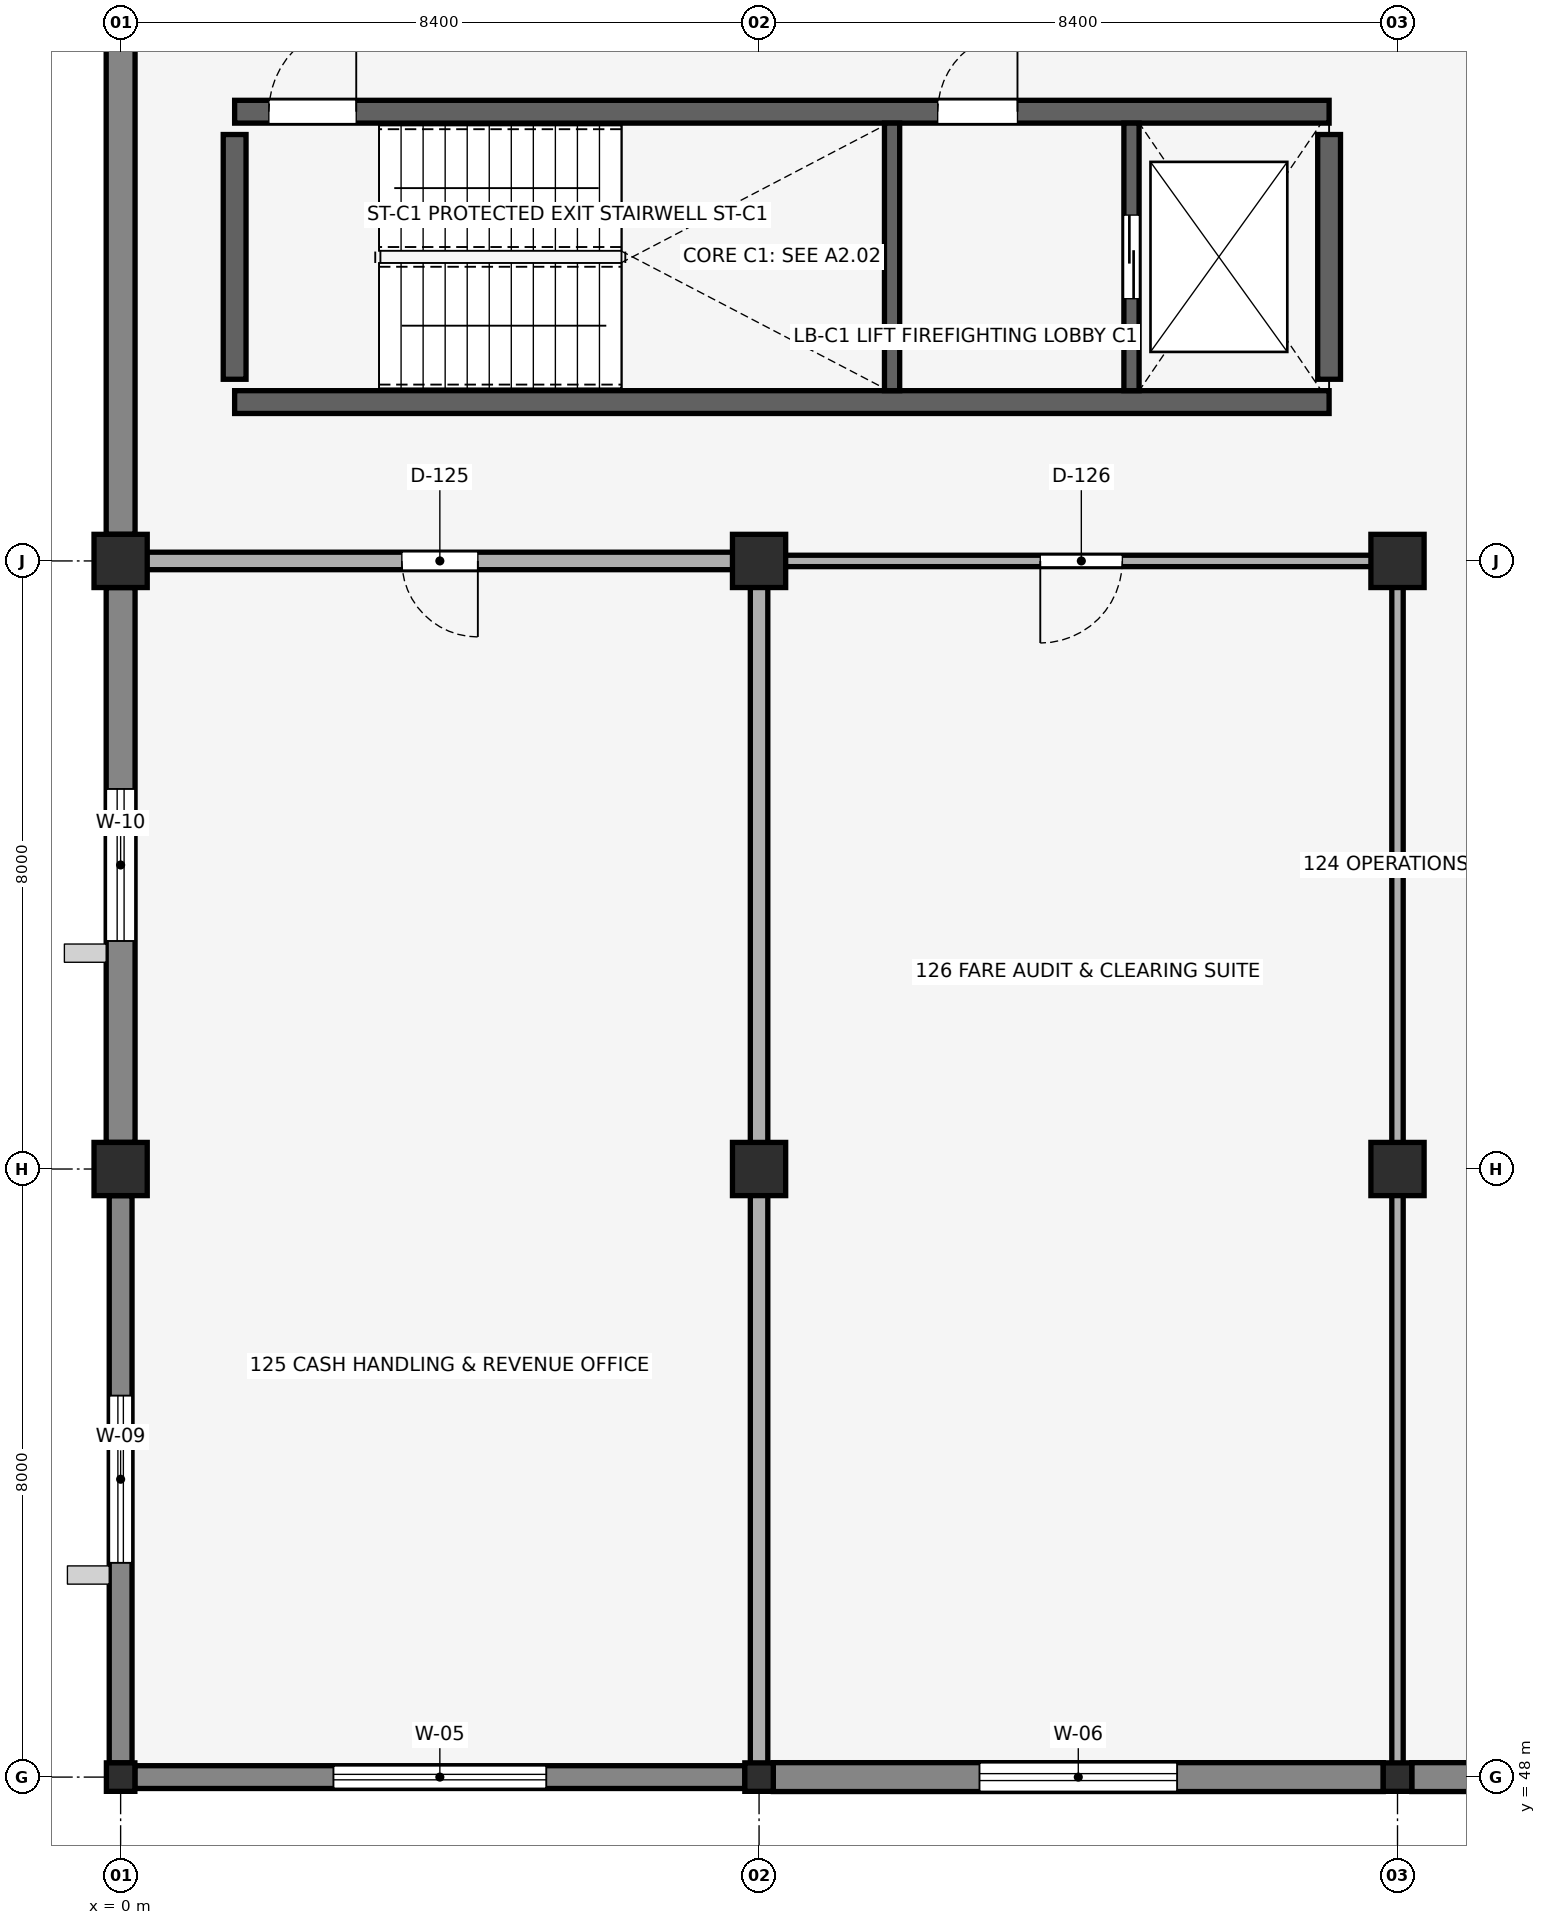
"""IFC4 building model, lengths in metres.
Left out: names, types, materials, properties, quantities, classifications, styles, units other than length and angle.
Written with IfcOpenShell. Run it as: python <this file> out.ifc"""

import sys

from ifc_helpers import new_model, si_unit, direction, frame, frame_2d, origin, origin_2d, place, context, subcontext, project, spatial, rectangle, i_section, extrude, element, fill, save


model = new_model("IFC4")
c1 = context("Model", 3, precision=1e-05, world=origin(), true_north=direction((0.0, 1.0)))
c2 = subcontext(c1, "Body", "Model", "MODEL_VIEW")
j1 = project(units=[si_unit("LENGTHUNIT", "METRE"), si_unit("PLANEANGLEUNIT", "RADIAN")], contexts=[c1])
p1 = place(None, origin())
s1 = spatial("IfcSite", under=j1, at=p1, CompositionType="ELEMENT")
p2 = place(p1, origin())
s2 = spatial("IfcBuilding", under=s1, at=p2, CompositionType="ELEMENT")
p3 = place(p2, frame((0.0, 0.0, 5.44)))
s3 = spatial("IfcBuildingStorey", under=s2, at=p3, CompositionType="ELEMENT", Elevation=5.44)
p4 = place(p3, frame((1.5, 66.09, 0.0), z_axis=(0.0, 0.0, 1.0), x_axis=(1.0, 0.0, 0.0)))
e1 = element("IfcWall", 1, at=p4, inside=s3, PredefinedType="SHEAR", context=c2, shape_type="SweptSolid", body=[
    extrude(rectangle(XDim=14.4, YDim=0.3, at=frame_2d((7.2, 0.0))), origin(), (0.0, 0.0, 1.0), 3.8),
])
p5 = place(p3, frame((1.5, 69.91, 0.0), z_axis=(0.0, 0.0, 1.0), x_axis=(1.0, 0.0, 0.0)))
e2 = element("IfcWall", 2, at=p5, inside=s3, PredefinedType="SHEAR", context=c2, shape_type="SweptSolid", body=[
    extrude(rectangle(XDim=14.4, YDim=0.3, at=frame_2d((7.2, 0.0))), origin(), (0.0, 0.0, 1.0), 3.8),
])
p6 = place(p5, frame((0.45, 0.0, 0.0), z_axis=(0.0, 0.0, 1.0), x_axis=(1.0, 0.0, 0.0)))
e3 = element("IfcOpeningElement", 3, at=p6, cuts=e2, PredefinedType="OPENING", context=c2, shape_type="SweptSolid", body=[
    extrude(rectangle(XDim=1.15, YDim=2.15, at=frame_2d((0.575, 1.075))), frame((0.0, 0.16, 0.0), z_axis=(0.0, -1.0, 0.0), x_axis=(1.0, 0.0, 0.0)), (0.0, 0.0, 1.0), 0.32),
])
p7 = place(p5, frame((9.25, 0.0, 0.0), z_axis=(0.0, 0.0, 1.0), x_axis=(1.0, 0.0, 0.0)))
e4 = element("IfcOpeningElement", 4, at=p7, cuts=e2, PredefinedType="OPENING", context=c2, shape_type="SweptSolid", body=[
    extrude(rectangle(XDim=1.05, YDim=2.15, at=frame_2d((0.525, 1.075))), frame((0.0, 0.16, 0.0), z_axis=(0.0, -1.0, 0.0), x_axis=(1.0, 0.0, 0.0)), (0.0, 0.0, 1.0), 0.32),
])
for number, where, z_axis, x_axis in (
    (5, (1.5, 66.39, 0.0), (0.0, 0.0, 1.0), (0.0, 1.0, 0.0)),
    (6, (15.9, 66.39, 0.0), (0.0, 0.0, 1.0), (0.0, 1.0, 0.0)),
):
    element("IfcWall", number, at=place(p3, frame(where, z_axis=z_axis, x_axis=x_axis)), inside=s3, PredefinedType="SHEAR", context=c2, shape_type="SweptSolid", body=[
        extrude(rectangle(XDim=3.22, YDim=0.3, at=frame_2d((1.61, 0.0))), origin(), (0.0, 0.0, 1.0), 3.8),
    ])
p8 = place(p3, frame((0.0, 48.0, 0.0), z_axis=(0.0, 0.0, 1.0), x_axis=(1.0, 0.0, 0.0)))
e7 = element("IfcColumn", 7, at=p8, inside=s3, PredefinedType="COLUMN", context=c2, shape_type="SweptSolid", body=[
    extrude(i_section(OverallWidth=0.375, OverallDepth=0.375, WebThickness=0.017, FlangeThickness=0.027, FilletRadius=0.015, at=origin_2d()), origin(), (0.0, 0.0, 1.0), 3.8),
])
for number, where, z_axis, x_axis in (
    (8, (0.0, 56.0, 0.0), (0.0, 0.0, 1.0), (1.0, 0.0, 0.0)),
    (9, (0.0, 64.0, 0.0), (0.0, 0.0, 1.0), (1.0, 0.0, 0.0)),
):
    element("IfcColumn", number, at=place(p3, frame(where, z_axis=z_axis, x_axis=x_axis)), inside=s3, PredefinedType="COLUMN", context=c2, shape_type="SweptSolid", body=[
        extrude(rectangle(XDim=0.7, YDim=0.7, at=origin_2d()), origin(), (0.0, 0.0, 1.0), 3.8),
    ])
p9 = place(p3, frame((8.4, 48.0, 0.0), z_axis=(0.0, 0.0, 1.0), x_axis=(1.0, 0.0, 0.0)))
e10 = element("IfcColumn", 10, at=p9, inside=s3, PredefinedType="COLUMN", context=c2, shape_type="SweptSolid", body=[
    extrude(i_section(OverallWidth=0.375, OverallDepth=0.375, WebThickness=0.017, FlangeThickness=0.027, FilletRadius=0.015, at=origin_2d()), origin(), (0.0, 0.0, 1.0), 3.8),
])
for number, where, z_axis, x_axis in (
    (11, (8.4, 56.0, 0.0), (0.0, 0.0, 1.0), (1.0, 0.0, 0.0)),
    (12, (8.4, 64.0, 0.0), (0.0, 0.0, 1.0), (1.0, 0.0, 0.0)),
):
    element("IfcColumn", number, at=place(p3, frame(where, z_axis=z_axis, x_axis=x_axis)), inside=s3, PredefinedType="COLUMN", context=c2, shape_type="SweptSolid", body=[
        extrude(rectangle(XDim=0.7, YDim=0.7, at=origin_2d()), origin(), (0.0, 0.0, 1.0), 3.8),
    ])
p10 = place(p3, frame((16.8, 48.0, 0.0), z_axis=(0.0, 0.0, 1.0), x_axis=(1.0, 0.0, 0.0)))
e13 = element("IfcColumn", 13, at=p10, inside=s3, PredefinedType="COLUMN", context=c2, shape_type="SweptSolid", body=[
    extrude(i_section(OverallWidth=0.375, OverallDepth=0.375, WebThickness=0.017, FlangeThickness=0.027, FilletRadius=0.015, at=origin_2d()), origin(), (0.0, 0.0, 1.0), 3.8),
])
for number, where, z_axis, x_axis in (
    (14, (16.8, 56.0, 0.0), (0.0, 0.0, 1.0), (1.0, 0.0, 0.0)),
    (15, (16.8, 64.0, 0.0), (0.0, 0.0, 1.0), (1.0, 0.0, 0.0)),
):
    element("IfcColumn", number, at=place(p3, frame(where, z_axis=z_axis, x_axis=x_axis)), inside=s3, PredefinedType="COLUMN", context=c2, shape_type="SweptSolid", body=[
        extrude(rectangle(XDim=0.7, YDim=0.7, at=origin_2d()), origin(), (0.0, 0.0, 1.0), 3.8),
    ])
p11 = place(p3, frame((0.187, 48.0, 0.0), z_axis=(0.0, 0.0, 1.0), x_axis=(1.0, 0.0, 0.0)))
e16 = element("IfcWall", 16, at=p11, inside=s3, PredefinedType="SOLIDWALL", context=c2, shape_type="SweptSolid", body=[
    extrude(rectangle(XDim=8.025, YDim=0.3, at=frame_2d((4.013, 0.0))), origin(), (0.0, 0.0, 1.0), 3.45),
])
p12 = place(p11, frame((2.613, 0.0, 0.9), z_axis=(0.0, 0.0, 1.0), x_axis=(1.0, 0.0, 0.0)))
e17 = element("IfcOpeningElement", 17, at=p12, cuts=e16, PredefinedType="OPENING", context=c2, shape_type="SweptSolid", body=[
    extrude(rectangle(XDim=2.8, YDim=1.6, at=frame_2d((1.4, 0.8))), frame((0.0, 0.16, 0.0), z_axis=(0.0, -1.0, 0.0), x_axis=(1.0, 0.0, 0.0)), (0.0, 0.0, 1.0), 0.32),
])
p13 = place(p3, frame((8.587, 48.0, 0.0), z_axis=(0.0, 0.0, 1.0), x_axis=(1.0, 0.0, 0.0)))
e18 = element("IfcWall", 18, at=p13, inside=s3, PredefinedType="SOLIDWALL", context=c2, shape_type="SweptSolid", body=[
    extrude(rectangle(XDim=8.025, YDim=0.38, at=frame_2d((4.013, 0.0))), origin(), (0.0, 0.0, 1.0), 3.45),
])
p14 = place(p13, frame((2.713, 0.0, 0.9), z_axis=(0.0, 0.0, 1.0), x_axis=(1.0, 0.0, 0.0)))
e19 = element("IfcOpeningElement", 19, at=p14, cuts=e18, PredefinedType="OPENING", context=c2, shape_type="SweptSolid", body=[
    extrude(rectangle(XDim=2.6, YDim=1.8, at=frame_2d((1.3, 0.9))), frame((0.0, 0.2, 0.0), z_axis=(0.0, -1.0, 0.0), x_axis=(1.0, 0.0, 0.0)), (0.0, 0.0, 1.0), 0.4),
])
p15 = place(p3, frame((16.987, 48.0, 0.0), z_axis=(0.0, 0.0, 1.0), x_axis=(1.0, 0.0, 0.0)))
e20 = element("IfcWall", 20, at=p15, inside=s3, PredefinedType="SOLIDWALL", context=c2, shape_type="SweptSolid", body=[
    extrude(rectangle(XDim=8.025, YDim=0.38, at=frame_2d((4.013, 0.0))), origin(), (0.0, 0.0, 1.0), 3.45),
])
p16 = place(p15, frame((2.813, 0.0, 0.9), z_axis=(0.0, 0.0, 1.0), x_axis=(1.0, 0.0, 0.0)))
e21 = element("IfcOpeningElement", 21, at=p16, cuts=e20, PredefinedType="OPENING", context=c2, shape_type="SweptSolid", body=[
    extrude(rectangle(XDim=2.4, YDim=1.75, at=frame_2d((1.2, 0.875))), frame((0.0, 0.2, 0.0), z_axis=(0.0, -1.0, 0.0), x_axis=(1.0, 0.0, 0.0)), (0.0, 0.0, 1.0), 0.4),
])
p17 = place(p3, frame((0.0, 48.187, 0.0), z_axis=(0.0, 0.0, 1.0), x_axis=(0.0, 1.0, 0.0)))
e22 = element("IfcWall", 22, at=p17, inside=s3, PredefinedType="SOLIDWALL", context=c2, shape_type="SweptSolid", body=[
    extrude(rectangle(XDim=7.463, YDim=0.3, at=frame_2d((3.731, 0.0))), origin(), (0.0, 0.0, 1.0), 3.442),
])
p18 = place(p17, frame((2.631, 0.0, 0.9), z_axis=(0.0, 0.0, 1.0), x_axis=(1.0, 0.0, 0.0)))
e23 = element("IfcOpeningElement", 23, at=p18, cuts=e22, PredefinedType="OPENING", context=c2, shape_type="SweptSolid", body=[
    extrude(rectangle(XDim=2.2, YDim=1.5, at=frame_2d((1.1, 0.75))), frame((0.0, 0.16, 0.0), z_axis=(0.0, -1.0, 0.0), x_axis=(1.0, 0.0, 0.0)), (0.0, 0.0, 1.0), 0.32),
])
p19 = place(p3, frame((0.0, 56.35, 0.0), z_axis=(0.0, 0.0, 1.0), x_axis=(0.0, 1.0, 0.0)))
e24 = element("IfcWall", 24, at=p19, inside=s3, PredefinedType="SOLIDWALL", context=c2, shape_type="SweptSolid", body=[
    extrude(rectangle(XDim=7.3, YDim=0.38, at=frame_2d((3.65, 0.0))), origin(), (0.0, 0.0, 1.0), 3.442),
])
p20 = place(p19, frame((2.65, 0.0, 0.9), z_axis=(0.0, 0.0, 1.0), x_axis=(1.0, 0.0, 0.0)))
e25 = element("IfcOpeningElement", 25, at=p20, cuts=e24, PredefinedType="OPENING", context=c2, shape_type="SweptSolid", body=[
    extrude(rectangle(XDim=2.0, YDim=1.5, at=frame_2d((1.0, 0.75))), frame((0.0, 0.2, 0.0), z_axis=(0.0, -1.0, 0.0), x_axis=(1.0, 0.0, 0.0)), (0.0, 0.0, 1.0), 0.4),
])
p21 = place(p3, frame((0.0, 64.35, 0.0), z_axis=(0.0, 0.0, 1.0), x_axis=(0.0, 1.0, 0.0)))
e26 = element("IfcWall", 26, at=p21, inside=s3, PredefinedType="SOLIDWALL", context=c2, shape_type="SweptSolid", body=[
    extrude(rectangle(XDim=7.3, YDim=0.38, at=frame_2d((3.65, 0.0))), origin(), (0.0, 0.0, 1.0), 3.5),
])
p22 = place(p3, frame((10.15, 66.24, 0.0), z_axis=(0.0, 0.0, 1.0), x_axis=(0.0, 1.0, 0.0)))
e27 = element("IfcWall", 27, at=p22, inside=s3, PredefinedType="SHEAR", context=c2, shape_type="SweptSolid", body=[
    extrude(rectangle(XDim=3.52, YDim=0.2, at=frame_2d((1.76, 0.0))), origin(), (0.0, 0.0, 1.0), 3.8),
])
p23 = place(p3, frame((13.3, 66.24, 0.0), z_axis=(0.0, 0.0, 1.0), x_axis=(0.0, 1.0, 0.0)))
e28 = element("IfcWall", 28, at=p23, inside=s3, PredefinedType="SHEAR", context=c2, shape_type="SweptSolid", body=[
    extrude(rectangle(XDim=3.52, YDim=0.2, at=frame_2d((1.76, 0.0))), origin(), (0.0, 0.0, 1.0), 3.8),
])
p24 = place(p23, frame((1.21, 0.0, 0.0), z_axis=(0.0, 0.0, 1.0), x_axis=(1.0, 0.0, 0.0)))
e29 = element("IfcOpeningElement", 29, at=p24, cuts=e28, PredefinedType="OPENING", context=c2, shape_type="SweptSolid", body=[
    extrude(rectangle(XDim=1.1, YDim=2.15, at=frame_2d((0.55, 1.075))), frame((0.0, 0.11, 0.0), z_axis=(0.0, -1.0, 0.0), x_axis=(1.0, 0.0, 0.0)), (0.0, 0.0, 1.0), 0.22),
])
p25 = place(p3, frame((0.34, 64.0, 0.0), z_axis=(0.0, 0.0, 1.0), x_axis=(1.0, 0.0, 0.0)))
e30 = element("IfcWall", 30, at=p25, inside=s3, PredefinedType="PARTITIONING", context=c2, shape_type="SweptSolid", body=[
    extrude(rectangle(XDim=7.72, YDim=0.23, at=frame_2d((3.86, 0.0))), origin(), (0.0, 0.0, 1.0), 3.26),
])
p26 = place(p25, frame((4.36, 0.0, 0.0), z_axis=(0.0, 0.0, 1.0), x_axis=(-1.0, 0.0, 0.0)))
e31 = element("IfcOpeningElement", 31, at=p26, cuts=e30, PredefinedType="OPENING", context=c2, shape_type="SweptSolid", body=[
    extrude(rectangle(XDim=1.0, YDim=2.15, at=frame_2d((0.5, 1.075))), frame((0.0, 0.125, 0.0), z_axis=(0.0, -1.0, 0.0), x_axis=(1.0, 0.0, 0.0)), (0.0, 0.0, 1.0), 0.25),
])
p27 = place(p3, frame((8.74, 64.0, 0.0), z_axis=(0.0, 0.0, 1.0), x_axis=(1.0, 0.0, 0.0)))
e32 = element("IfcWall", 32, at=p27, inside=s3, PredefinedType="PARTITIONING", context=c2, shape_type="SweptSolid", body=[
    extrude(rectangle(XDim=7.72, YDim=0.15, at=frame_2d((3.86, 0.0))), origin(), (0.0, 0.0, 1.0), 3.26),
])
p28 = place(p27, frame((4.44, 0.0, 0.0), z_axis=(0.0, 0.0, 1.0), x_axis=(-1.0, 0.0, 0.0)))
e33 = element("IfcOpeningElement", 33, at=p28, cuts=e32, PredefinedType="OPENING", context=c2, shape_type="SweptSolid", body=[
    extrude(rectangle(XDim=1.08, YDim=2.18, at=frame_2d((0.54, 1.09))), frame((0.0, 0.085, 0.0), z_axis=(0.0, -1.0, 0.0), x_axis=(1.0, 0.0, 0.0)), (0.0, 0.0, 1.0), 0.17),
])
p29 = place(p3, frame((8.4, 48.177, 0.0), z_axis=(0.0, 0.0, 1.0), x_axis=(0.0, 1.0, 0.0)))
e34 = element("IfcWall", 34, at=p29, inside=s3, PredefinedType="PARTITIONING", context=c2, shape_type="SweptSolid", body=[
    extrude(rectangle(XDim=7.483, YDim=0.23, at=frame_2d((3.741, 0.0))), origin(), (0.0, 0.0, 1.0), 3.337),
])
p30 = place(p3, frame((8.4, 56.34, 0.0), z_axis=(0.0, 0.0, 1.0), x_axis=(0.0, 1.0, 0.0)))
e35 = element("IfcWall", 35, at=p30, inside=s3, PredefinedType="PARTITIONING", context=c2, shape_type="SweptSolid", body=[
    extrude(rectangle(XDim=7.32, YDim=0.23, at=frame_2d((3.66, 0.0))), origin(), (0.0, 0.0, 1.0), 3.337),
])
p31 = place(p3, frame((16.8, 48.177, 0.0), z_axis=(0.0, 0.0, 1.0), x_axis=(0.0, 1.0, 0.0)))
e36 = element("IfcWall", 36, at=p31, inside=s3, PredefinedType="PARTITIONING", context=c2, shape_type="SweptSolid", body=[
    extrude(rectangle(XDim=7.483, YDim=0.15, at=frame_2d((3.741, 0.0))), origin(), (0.0, 0.0, 1.0), 3.337),
])
p32 = place(p3, frame((16.8, 56.34, 0.0), z_axis=(0.0, 0.0, 1.0), x_axis=(0.0, 1.0, 0.0)))
e37 = element("IfcWall", 37, at=p32, inside=s3, PredefinedType="PARTITIONING", context=c2, shape_type="SweptSolid", body=[
    extrude(rectangle(XDim=7.32, YDim=0.15, at=frame_2d((3.66, 0.0))), origin(), (0.0, 0.0, 1.0), 3.337),
])
p33 = place(p12, origin())
e38 = element("IfcWindow", 38, at=p33, inside=s3, PartitioningType="DOUBLE_PANEL_VERTICAL", PredefinedType="WINDOW", context=c2, shape_type="SweptSolid", body=[
    extrude(rectangle(XDim=2.8, YDim=1.6, at=frame_2d((1.4, 0.8))), frame((0.0, 0.03, 0.0), z_axis=(0.0, -1.0, 0.0), x_axis=(1.0, 0.0, 0.0)), (0.0, 0.0, 1.0), 0.06),
])
fill(e17, e38)
p34 = place(p14, origin())
e39 = element("IfcWindow", 39, at=p34, inside=s3, PartitioningType="DOUBLE_PANEL_VERTICAL", PredefinedType="WINDOW", context=c2, shape_type="SweptSolid", body=[
    extrude(rectangle(XDim=2.6, YDim=1.8, at=frame_2d((1.3, 0.9))), frame((0.0, 0.03, 0.0), z_axis=(0.0, -1.0, 0.0), x_axis=(1.0, 0.0, 0.0)), (0.0, 0.0, 1.0), 0.06),
])
fill(e19, e39)
p35 = place(p18, origin())
e40 = element("IfcWindow", 40, at=p35, inside=s3, PartitioningType="DOUBLE_PANEL_VERTICAL", PredefinedType="WINDOW", context=c2, shape_type="SweptSolid", body=[
    extrude(rectangle(XDim=2.2, YDim=1.5, at=frame_2d((1.1, 0.75))), frame((0.0, 0.03, 0.0), z_axis=(0.0, -1.0, 0.0), x_axis=(1.0, 0.0, 0.0)), (0.0, 0.0, 1.0), 0.06),
])
fill(e23, e40)
p36 = place(p20, origin())
e41 = element("IfcWindow", 41, at=p36, inside=s3, PartitioningType="DOUBLE_PANEL_VERTICAL", PredefinedType="WINDOW", context=c2, shape_type="SweptSolid", body=[
    extrude(rectangle(XDim=2.0, YDim=1.5, at=frame_2d((1.0, 0.75))), frame((0.0, 0.03, 0.0), z_axis=(0.0, -1.0, 0.0), x_axis=(1.0, 0.0, 0.0)), (0.0, 0.0, 1.0), 0.06),
])
fill(e25, e41)
p37 = place(p6, origin())
e42 = element("IfcDoor", 42, at=p37, inside=s3, OperationType="SINGLE_SWING_RIGHT", PredefinedType="DOOR", context=c2, shape_type="SweptSolid", body=[
    extrude(rectangle(XDim=1.15, YDim=2.15, at=frame_2d((0.575, 1.075))), frame((0.0, 0.025, 0.0), z_axis=(0.0, -1.0, 0.0), x_axis=(1.0, 0.0, 0.0)), (0.0, 0.0, 1.0), 0.05),
])
fill(e3, e42)
p38 = place(p7, origin())
e43 = element("IfcDoor", 43, at=p38, inside=s3, OperationType="SINGLE_SWING_RIGHT", PredefinedType="DOOR", context=c2, shape_type="SweptSolid", body=[
    extrude(rectangle(XDim=1.05, YDim=2.15, at=frame_2d((0.525, 1.075))), frame((0.0, 0.025, 0.0), z_axis=(0.0, -1.0, 0.0), x_axis=(1.0, 0.0, 0.0)), (0.0, 0.0, 1.0), 0.05),
])
fill(e4, e43)
p39 = place(p24, origin())
e44 = element("IfcDoor", 44, at=p39, inside=s3, OperationType="DOUBLE_DOOR_SLIDING", PredefinedType="DOOR", context=c2, shape_type="SweptSolid", body=[
    extrude(rectangle(XDim=1.1, YDim=2.15, at=frame_2d((0.55, 1.075))), frame((0.0, 0.025, 0.0), z_axis=(0.0, -1.0, 0.0), x_axis=(1.0, 0.0, 0.0)), (0.0, 0.0, 1.0), 0.05),
])
fill(e29, e44)
p40 = place(p26, origin())
e45 = element("IfcDoor", 45, at=p40, inside=s3, OperationType="SINGLE_SWING_LEFT", PredefinedType="DOOR", context=c2, shape_type="SweptSolid", body=[
    extrude(rectangle(XDim=1.0, YDim=2.15, at=frame_2d((0.5, 1.075))), frame((0.0, 0.025, 0.0), z_axis=(0.0, -1.0, 0.0), x_axis=(1.0, 0.0, 0.0)), (0.0, 0.0, 1.0), 0.05),
])
fill(e31, e45)
p41 = place(p28, origin())
e46 = element("IfcDoor", 46, at=p41, inside=s3, OperationType="SINGLE_SWING_RIGHT", PredefinedType="DOOR", context=c2, shape_type="SweptSolid", body=[
    extrude(rectangle(XDim=1.08, YDim=2.18, at=frame_2d((0.54, 1.09))), frame((0.0, 0.025, 0.0), z_axis=(0.0, -1.0, 0.0), x_axis=(1.0, 0.0, 0.0)), (0.0, 0.0, 1.0), 0.05),
])
fill(e33, e46)
save(model, sys.argv[1])
